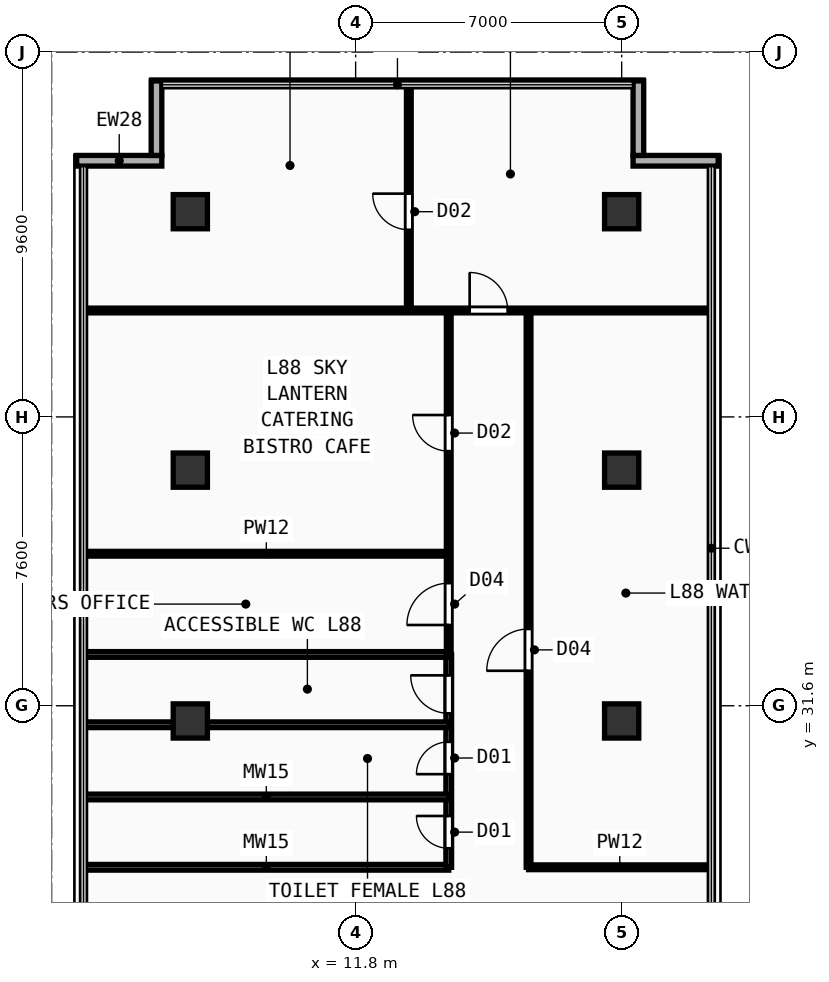
"""IFC4 building model, lengths in metres.
Left out: names, types, materials, properties, quantities, classifications, styles, units other than length and angle.
Written with IfcOpenShell. Run it as: python <this file> out.ifc"""

import sys

from ifc_helpers import new_model, si_unit, direction, frame, frame_2d, origin, origin_2d, place, context, subcontext, project, spatial, rectangle, extrude, element, fill, save


model = new_model("IFC4")
c1 = context("Model", 3, precision=1e-05, world=origin(), true_north=direction((0.0, 1.0)))
c2 = subcontext(c1, "Body", "Model", "MODEL_VIEW")
j1 = project(units=[si_unit("LENGTHUNIT", "METRE"), si_unit("PLANEANGLEUNIT", "RADIAN")], contexts=[c1])
p1 = place(None, origin())
s1 = spatial("IfcSite", under=j1, at=p1, CompositionType="ELEMENT")
p2 = place(p1, origin())
s2 = spatial("IfcBuilding", under=s1, at=p2, CompositionType="ELEMENT")
p3 = place(p2, frame((0.0, 0.0, 344.2)))
s3 = spatial("IfcBuildingStorey", under=s2, at=p3, CompositionType="ELEMENT", Elevation=344.2)
for number, where, z_axis, x_axis in (
    (1, (7.45, 31.2, 0.0), (0.0, 0.0, 1.0), (1.0, 0.0, 0.0)),
    (2, (7.45, 37.8, 0.0), (0.0, 0.0, 1.0), (1.0, 0.0, 0.0)),
    (3, (7.45, 44.6, 0.0), (0.0, 0.0, 1.0), (1.0, 0.0, 0.0)),
    (4, (18.8, 31.2, 0.0), (0.0, 0.0, 1.0), (1.0, 0.0, 0.0)),
    (5, (18.8, 37.8, 0.0), (0.0, 0.0, 1.0), (1.0, 0.0, 0.0)),
    (6, (18.8, 44.6, 0.0), (0.0, 0.0, 1.0), (1.0, 0.0, 0.0)),
):
    element("IfcColumn", number, at=place(p3, frame(where, z_axis=z_axis, x_axis=x_axis)), inside=s3, PredefinedType="COLUMN", context=c2, shape_type="SweptSolid", body=[
        extrude(rectangle(XDim=0.9, YDim=0.9, at=origin_2d()), origin(), (0.0, 0.0, 1.0), 3.66),
    ])
p4 = place(p3, frame((19.1, 45.94, 0.0), z_axis=(0.0, 0.0, 1.0), x_axis=(1.0, 0.0, 0.0)))
e7 = element("IfcWall", 7, at=p4, inside=s3, PredefinedType="SOLIDWALL", context=c2, shape_type="SweptSolid", body=[
    extrude(rectangle(XDim=2.24, YDim=0.28, at=frame_2d((1.12, 0.0))), origin(), (0.0, 0.0, 1.0), 3.66),
])
p5 = place(p3, frame((19.24, 46.08, 0.0), z_axis=(0.0, 0.0, 1.0), x_axis=(0.0, 1.0, 0.0)))
e8 = element("IfcWall", 8, at=p5, inside=s3, PredefinedType="SOLIDWALL", context=c2, shape_type="SweptSolid", body=[
    extrude(rectangle(XDim=1.96, YDim=0.28, at=frame_2d((0.98, 0.0))), origin(), (0.0, 0.0, 1.0), 3.66),
])
p6 = place(p3, frame((4.46, 45.94, 0.0), z_axis=(0.0, 0.0, 1.0), x_axis=(1.0, 0.0, 0.0)))
e9 = element("IfcWall", 9, at=p6, inside=s3, PredefinedType="SOLIDWALL", context=c2, shape_type="SweptSolid", body=[
    extrude(rectangle(XDim=2.24, YDim=0.28, at=frame_2d((1.12, 0.0))), origin(), (0.0, 0.0, 1.0), 3.66),
])
p7 = place(p3, frame((6.56, 46.08, 0.0), z_axis=(0.0, 0.0, 1.0), x_axis=(0.0, 1.0, 0.0)))
e10 = element("IfcWall", 10, at=p7, inside=s3, PredefinedType="SOLIDWALL", context=c2, shape_type="SweptSolid", body=[
    extrude(rectangle(XDim=1.96, YDim=0.28, at=frame_2d((0.98, 0.0))), origin(), (0.0, 0.0, 1.0), 3.66),
])
p8 = place(p3, frame((4.65, 27.35, 0.0), z_axis=(0.0, 0.0, 1.0), x_axis=(1.0, 0.0, 0.0)))
e11 = element("IfcWall", 11, at=p8, inside=s3, PredefinedType="PLUMBINGWALL", context=c2, shape_type="SweptSolid", body=[
    extrude(rectangle(XDim=9.6, YDim=0.15, at=frame_2d((4.8, 0.0))), origin(), (0.0, 0.0, 1.0), 3.66),
])
p9 = place(p3, frame((14.25, 27.35, 0.0), z_axis=(0.0, 0.0, 1.0), x_axis=(0.0, 1.0, 0.0)))
e12 = element("IfcWall", 12, at=p9, inside=s3, PredefinedType="PLUMBINGWALL", context=c2, shape_type="SweptSolid", body=[
    extrude(rectangle(XDim=5.6, YDim=0.15, at=frame_2d((2.8, 0.0))), origin(), (0.0, 0.0, 1.0), 3.66),
])
p10 = place(p9, frame((0.5, 0.0, 0.0)))
e13 = element("IfcOpeningElement", 13, at=p10, cuts=e12, PredefinedType="OPENING", context=c2, shape_type="SweptSolid", body=[
    extrude(rectangle(XDim=0.85, YDim=2.15, at=frame_2d((0.425, 1.075))), frame((0.0, 0.085, 0.0), z_axis=(0.0, -1.0, 0.0), x_axis=(1.0, 0.0, 0.0)), (0.0, 0.0, 1.0), 0.17),
])
p11 = place(p9, frame((2.45, 0.0, 0.0)))
e14 = element("IfcOpeningElement", 14, at=p11, cuts=e12, PredefinedType="OPENING", context=c2, shape_type="SweptSolid", body=[
    extrude(rectangle(XDim=0.85, YDim=2.15, at=frame_2d((0.425, 1.075))), frame((0.0, 0.085, 0.0), z_axis=(0.0, -1.0, 0.0), x_axis=(1.0, 0.0, 0.0)), (0.0, 0.0, 1.0), 0.17),
])
p12 = place(p9, frame((4.05, 0.0, 0.0)))
e15 = element("IfcOpeningElement", 15, at=p12, cuts=e12, PredefinedType="OPENING", context=c2, shape_type="SweptSolid", body=[
    extrude(rectangle(XDim=1.0, YDim=2.2, at=frame_2d((0.5, 1.1))), frame((0.0, 0.085, 0.0), z_axis=(0.0, -1.0, 0.0), x_axis=(1.0, 0.0, 0.0)), (0.0, 0.0, 1.0), 0.17),
])
p13 = place(p3, frame((4.65, 29.2, 0.0), z_axis=(0.0, 0.0, 1.0), x_axis=(1.0, 0.0, 0.0)))
e16 = element("IfcWall", 16, at=p13, inside=s3, PredefinedType="PLUMBINGWALL", context=c2, shape_type="SweptSolid", body=[
    extrude(rectangle(XDim=9.6, YDim=0.15, at=frame_2d((4.8, 0.0))), origin(), (0.0, 0.0, 1.0), 3.36),
])
p14 = place(p3, frame((4.65, 31.1, 0.0), z_axis=(0.0, 0.0, 1.0), x_axis=(1.0, 0.0, 0.0)))
e17 = element("IfcWall", 17, at=p14, inside=s3, PredefinedType="PLUMBINGWALL", context=c2, shape_type="SweptSolid", body=[
    extrude(rectangle(XDim=9.6, YDim=0.15, at=frame_2d((4.8, 0.0))), origin(), (0.0, 0.0, 1.0), 2.86),
])
p15 = place(p3, frame((4.65, 32.95, 0.0), z_axis=(0.0, 0.0, 1.0), x_axis=(1.0, 0.0, 0.0)))
e18 = element("IfcWall", 18, at=p15, inside=s3, PredefinedType="PLUMBINGWALL", context=c2, shape_type="SweptSolid", body=[
    extrude(rectangle(XDim=9.6, YDim=0.15, at=frame_2d((4.8, 0.0))), origin(), (0.0, 0.0, 1.0), 3.66),
])
p16 = place(p3, frame((14.25, 32.95, 0.0), z_axis=(0.0, 0.0, 1.0), x_axis=(0.0, 1.0, 0.0)))
e19 = element("IfcWall", 19, at=p16, inside=s3, PredefinedType="PARTITIONING", context=c2, shape_type="SweptSolid", body=[
    extrude(rectangle(XDim=9.05, YDim=0.125, at=frame_2d((4.525, 0.0))), origin(), (0.0, 0.0, 1.0), 3.66),
])
p17 = place(p16, frame((0.775, 0.0, 0.0)))
e20 = element("IfcOpeningElement", 20, at=p17, cuts=e19, PredefinedType="OPENING", context=c2, shape_type="SweptSolid", body=[
    extrude(rectangle(XDim=1.1, YDim=2.2, at=frame_2d((0.55, 1.1))), frame((0.0, 0.073, 0.0), z_axis=(0.0, -1.0, 0.0), x_axis=(1.0, 0.0, 0.0)), (0.0, 0.0, 1.0), 0.145),
])
p18 = place(p16, frame((5.35, 0.0, 0.0)))
e21 = element("IfcOpeningElement", 21, at=p18, cuts=e19, PredefinedType="OPENING", context=c2, shape_type="SweptSolid", body=[
    extrude(rectangle(XDim=0.95, YDim=2.15, at=frame_2d((0.475, 1.075))), frame((0.0, 0.073, 0.0), z_axis=(0.0, -1.0, 0.0), x_axis=(1.0, 0.0, 0.0)), (0.0, 0.0, 1.0), 0.145),
])
p19 = place(p3, frame((4.65, 35.6, 0.0), z_axis=(0.0, 0.0, 1.0), x_axis=(1.0, 0.0, 0.0)))
e22 = element("IfcWall", 22, at=p19, inside=s3, PredefinedType="PARTITIONING", context=c2, shape_type="SweptSolid", body=[
    extrude(rectangle(XDim=9.6, YDim=0.125, at=frame_2d((4.8, 0.0))), origin(), (0.0, 0.0, 1.0), 3.36),
])
p20 = place(p3, frame((4.65, 42.0, 0.0), z_axis=(0.0, 0.0, 1.0), x_axis=(1.0, 0.0, 0.0)))
e23 = element("IfcWall", 23, at=p20, inside=s3, PredefinedType="PARTITIONING", context=c2, shape_type="SweptSolid", body=[
    extrude(rectangle(XDim=16.5, YDim=0.125, at=frame_2d((8.25, 0.0))), origin(), (0.0, 0.0, 1.0), 3.66),
])
p21 = place(p20, frame((10.15, 0.0, 0.0)))
e24 = element("IfcOpeningElement", 24, at=p21, cuts=e23, PredefinedType="OPENING", context=c2, shape_type="SweptSolid", body=[
    extrude(rectangle(XDim=1.0, YDim=2.2, at=frame_2d((0.5, 1.1))), frame((0.0, 0.073, 0.0), z_axis=(0.0, -1.0, 0.0), x_axis=(1.0, 0.0, 0.0)), (0.0, 0.0, 1.0), 0.145),
])
p22 = place(p3, frame((13.2, 42.0, 0.0), z_axis=(0.0, 0.0, 1.0), x_axis=(0.0, 1.0, 0.0)))
e25 = element("IfcWall", 25, at=p22, inside=s3, PredefinedType="PARTITIONING", context=c2, shape_type="SweptSolid", body=[
    extrude(rectangle(XDim=5.85, YDim=0.125, at=frame_2d((2.925, 0.0))), origin(), (0.0, 0.0, 1.0), 3.66),
])
p23 = place(p22, frame((2.125, 0.0, 0.0)))
e26 = element("IfcOpeningElement", 26, at=p23, cuts=e25, PredefinedType="OPENING", context=c2, shape_type="SweptSolid", body=[
    extrude(rectangle(XDim=0.95, YDim=2.15, at=frame_2d((0.475, 1.075))), frame((0.0, 0.073, 0.0), z_axis=(0.0, -1.0, 0.0), x_axis=(1.0, 0.0, 0.0)), (0.0, 0.0, 1.0), 0.145),
])
p24 = place(p3, frame((16.35, 27.35, 0.0), z_axis=(0.0, 0.0, 1.0), x_axis=(0.0, 1.0, 0.0)))
e27 = element("IfcWall", 27, at=p24, inside=s3, PredefinedType="PARTITIONING", context=c2, shape_type="SweptSolid", body=[
    extrude(rectangle(XDim=14.65, YDim=0.125, at=frame_2d((7.325, 0.0))), origin(), (0.0, 0.0, 1.0), 3.66),
])
p25 = place(p24, frame((5.17, 0.0, 0.0)))
e28 = element("IfcOpeningElement", 28, at=p25, cuts=e27, PredefinedType="OPENING", context=c2, shape_type="SweptSolid", body=[
    extrude(rectangle(XDim=1.1, YDim=2.2, at=frame_2d((0.55, 1.1))), frame((0.0, 0.073, 0.0), z_axis=(0.0, -1.0, 0.0), x_axis=(1.0, 0.0, 0.0)), (0.0, 0.0, 1.0), 0.145),
])
p26 = place(p3, frame((16.35, 27.35, 0.0), z_axis=(0.0, 0.0, 1.0), x_axis=(1.0, 0.0, 0.0)))
e29 = element("IfcWall", 29, at=p26, inside=s3, PredefinedType="PARTITIONING", context=c2, shape_type="SweptSolid", body=[
    extrude(rectangle(XDim=4.8, YDim=0.125, at=frame_2d((2.4, 0.0))), origin(), (0.0, 0.0, 1.0), 3.66),
])
p27 = place(p10, origin())
e30 = element("IfcDoor", 30, at=p27, inside=s3, OperationType="SINGLE_SWING_RIGHT", PredefinedType="DOOR", context=c2, shape_type="SweptSolid", body=[
    extrude(rectangle(XDim=0.85, YDim=2.15, at=frame_2d((0.425, 1.075))), frame((0.0, 0.025, 0.0), z_axis=(0.0, -1.0, 0.0), x_axis=(1.0, 0.0, 0.0)), (0.0, 0.0, 1.0), 0.05),
])
fill(e13, e30)
p28 = place(p11, origin())
e31 = element("IfcDoor", 31, at=p28, inside=s3, OperationType="SINGLE_SWING_LEFT", PredefinedType="DOOR", context=c2, shape_type="SweptSolid", body=[
    extrude(rectangle(XDim=0.85, YDim=2.15, at=frame_2d((0.425, 1.075))), frame((0.0, 0.025, 0.0), z_axis=(0.0, -1.0, 0.0), x_axis=(1.0, 0.0, 0.0)), (0.0, 0.0, 1.0), 0.05),
])
fill(e14, e31)
p29 = place(p12, origin())
e32 = element("IfcDoor", 32, at=p29, inside=s3, OperationType="SINGLE_SWING_RIGHT", PredefinedType="DOOR", context=c2, shape_type="SweptSolid", body=[
    extrude(rectangle(XDim=1.0, YDim=2.2, at=frame_2d((0.5, 1.1))), frame((0.0, 0.025, 0.0), z_axis=(0.0, -1.0, 0.0), x_axis=(1.0, 0.0, 0.0)), (0.0, 0.0, 1.0), 0.05),
])
fill(e15, e32)
p30 = place(p17, origin())
e33 = element("IfcDoor", 33, at=p30, inside=s3, OperationType="SINGLE_SWING_LEFT", PredefinedType="DOOR", context=c2, shape_type="SweptSolid", body=[
    extrude(rectangle(XDim=1.1, YDim=2.2, at=frame_2d((0.55, 1.1))), frame((0.0, 0.025, 0.0), z_axis=(0.0, -1.0, 0.0), x_axis=(1.0, 0.0, 0.0)), (0.0, 0.0, 1.0), 0.05),
])
fill(e20, e33)
p31 = place(p18, origin())
e34 = element("IfcDoor", 34, at=p31, inside=s3, OperationType="SINGLE_SWING_RIGHT", PredefinedType="DOOR", context=c2, shape_type="SweptSolid", body=[
    extrude(rectangle(XDim=0.95, YDim=2.15, at=frame_2d((0.475, 1.075))), frame((0.0, 0.025, 0.0), z_axis=(0.0, -1.0, 0.0), x_axis=(1.0, 0.0, 0.0)), (0.0, 0.0, 1.0), 0.05),
])
fill(e21, e34)
p32 = place(p21, origin())
e35 = element("IfcDoor", 35, at=p32, inside=s3, OperationType="SINGLE_SWING_LEFT", PredefinedType="DOOR", context=c2, shape_type="SweptSolid", body=[
    extrude(rectangle(XDim=1.0, YDim=2.2, at=frame_2d((0.5, 1.1))), frame((0.0, 0.025, 0.0), z_axis=(0.0, -1.0, 0.0), x_axis=(1.0, 0.0, 0.0)), (0.0, 0.0, 1.0), 0.05),
])
fill(e24, e35)
p33 = place(p23, origin())
e36 = element("IfcDoor", 36, at=p33, inside=s3, OperationType="SINGLE_SWING_RIGHT", PredefinedType="DOOR", context=c2, shape_type="SweptSolid", body=[
    extrude(rectangle(XDim=0.95, YDim=2.15, at=frame_2d((0.475, 1.075))), frame((0.0, 0.025, 0.0), z_axis=(0.0, -1.0, 0.0), x_axis=(1.0, 0.0, 0.0)), (0.0, 0.0, 1.0), 0.05),
])
fill(e26, e36)
p34 = place(p25, origin())
e37 = element("IfcDoor", 37, at=p34, inside=s3, OperationType="SINGLE_SWING_LEFT", PredefinedType="DOOR", context=c2, shape_type="SweptSolid", body=[
    extrude(rectangle(XDim=1.1, YDim=2.2, at=frame_2d((0.55, 1.1))), frame((0.0, 0.025, 0.0), z_axis=(0.0, -1.0, 0.0), x_axis=(1.0, 0.0, 0.0)), (0.0, 0.0, 1.0), 0.05),
])
fill(e28, e37)
save(model, sys.argv[1])
